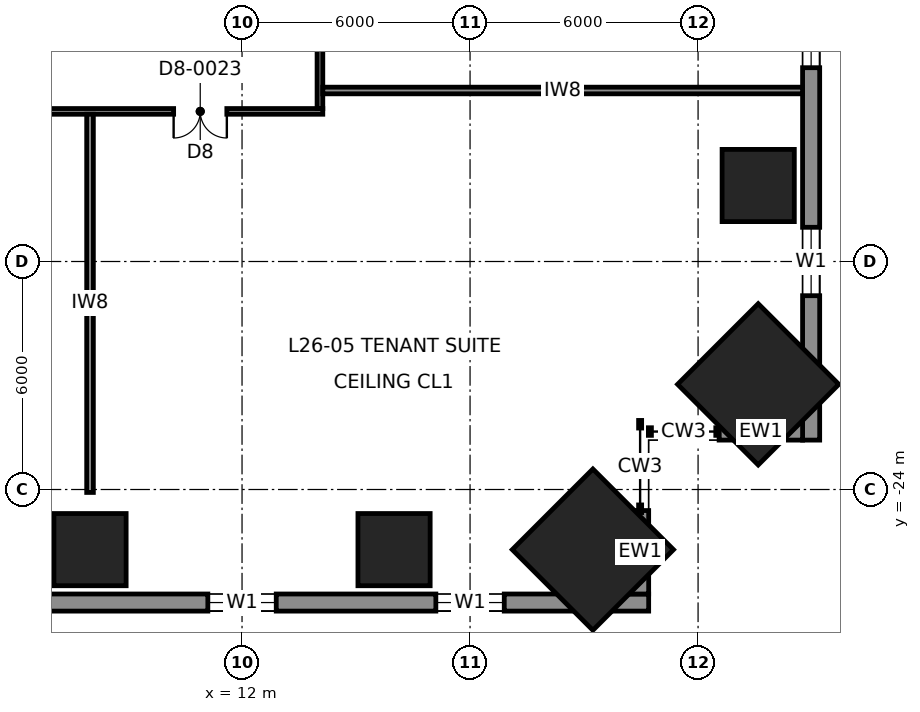
"""IFC4 building model, lengths in metres.
Left out: names, types, materials, properties, quantities, classifications, styles, units other than length and angle.
Written with IfcOpenShell. Run it as: python <this file> out.ifc"""

import sys

from ifc_helpers import new_model, si_unit, direction, frame, frame_2d, origin, origin_2d, place, context, subcontext, project, spatial, rectangle, extrude, element, fill, save


model = new_model("IFC4")
c1 = context("Model", 3, precision=1e-05, world=origin(), true_north=direction((0.0, 1.0)))
c2 = subcontext(c1, "Body", "Model", "MODEL_VIEW")
j1 = project(units=[si_unit("LENGTHUNIT", "METRE"), si_unit("PLANEANGLEUNIT", "RADIAN")], contexts=[c1])
p1 = place(None, origin())
s1 = spatial("IfcSite", under=j1, at=p1, CompositionType="ELEMENT")
p2 = place(p1, origin())
s2 = spatial("IfcBuilding", under=s1, at=p2, CompositionType="ELEMENT")
p3 = place(p2, frame((0.0, 0.0, 131.8)))
s3 = spatial("IfcBuildingStorey", under=s2, at=p3, CompositionType="ELEMENT", Elevation=131.8)
for number, where, z_axis, x_axis in (
    (1, (25.582, -21.232, 0.0), (-0.04, 0.04, 0.998), (-0.707, -0.708, 0.0)),
    (2, (21.232, -25.582, 0.0), (-0.04, 0.04, 0.998), (-0.708, -0.707, 0.0)),
):
    element("IfcColumn", number, at=place(p3, frame(where, z_axis=z_axis, x_axis=x_axis)), inside=s3, PredefinedType="COLUMN", context=c2, shape_type="SweptSolid", body=[
        extrude(rectangle(XDim=3.0, YDim=3.0, at=origin_2d()), origin(), (0.0, 0.0, 1.0), 4.007),
    ])
for number, where, z_axis, x_axis in (
    (3, (25.582, -16.0, 0.0), (-0.04, 0.0, 0.999), (0.0, -1.0, 0.0)),
    (4, (8.0, -25.582, 0.0), (0.0, 0.04, 0.999), (-1.0, 0.0, 0.0)),
    (5, (16.0, -25.582, 0.0), (0.0, 0.04, 0.999), (-1.0, 0.0, 0.0)),
):
    element("IfcColumn", number, at=place(p3, frame(where, z_axis=z_axis, x_axis=x_axis)), inside=s3, PredefinedType="COLUMN", context=c2, shape_type="SweptSolid", body=[
        extrude(rectangle(XDim=1.9, YDim=1.9, at=origin_2d()), origin(), (0.0, 0.0, 1.0), 4.003),
    ])
p4 = place(p3, frame((26.975, -22.7, 0.0), z_axis=(0.0, 0.0, 1.0), x_axis=(0.0, 1.0, 0.0)))
e6 = element("IfcWall", 6, at=p4, inside=s3, PredefinedType="SOLIDWALL", context=c2, shape_type="SweptSolid", body=[
    extrude(rectangle(XDim=45.4, YDim=0.45, at=frame_2d((22.7, 0.0))), origin(), (0.0, 0.0, 1.0), 3.83),
])
p5 = place(p4, frame((3.8, 0.0, 0.7)))
e7 = element("IfcOpeningElement", 7, at=p5, cuts=e6, PredefinedType="OPENING", context=c2, shape_type="SweptSolid", body=[
    extrude(rectangle(XDim=1.8, YDim=2.6, at=frame_2d((0.9, 1.3))), frame((0.0, 0.235, 0.0), z_axis=(0.0, -1.0, 0.0), x_axis=(1.0, 0.0, 0.0)), (0.0, 0.0, 1.0), 0.47),
])
p6 = place(p4, frame((9.8, 0.0, 0.7)))
e8 = element("IfcOpeningElement", 8, at=p6, cuts=e6, PredefinedType="OPENING", context=c2, shape_type="SweptSolid", body=[
    extrude(rectangle(XDim=1.8, YDim=2.6, at=frame_2d((0.9, 1.3))), frame((0.0, 0.235, 0.0), z_axis=(0.0, -1.0, 0.0), x_axis=(1.0, 0.0, 0.0)), (0.0, 0.0, 1.0), 0.47),
])
p7 = place(p4, frame((15.8, 0.0, 0.7)))
e9 = element("IfcOpeningElement", 9, at=p7, cuts=e6, PredefinedType="OPENING", context=c2, shape_type="SweptSolid", body=[
    extrude(rectangle(XDim=1.8, YDim=2.6, at=frame_2d((0.9, 1.3))), frame((0.0, 0.235, 0.0), z_axis=(0.0, -1.0, 0.0), x_axis=(1.0, 0.0, 0.0)), (0.0, 0.0, 1.0), 0.47),
])
p8 = place(p4, frame((18.8, 0.0, 0.7)))
e10 = element("IfcOpeningElement", 10, at=p8, cuts=e6, PredefinedType="OPENING", context=c2, shape_type="SweptSolid", body=[
    extrude(rectangle(XDim=1.8, YDim=2.6, at=frame_2d((0.9, 1.3))), frame((0.0, 0.235, 0.0), z_axis=(0.0, -1.0, 0.0), x_axis=(1.0, 0.0, 0.0)), (0.0, 0.0, 1.0), 0.47),
])
p9 = place(p4, frame((24.8, 0.0, 0.7)))
e11 = element("IfcOpeningElement", 11, at=p9, cuts=e6, PredefinedType="OPENING", context=c2, shape_type="SweptSolid", body=[
    extrude(rectangle(XDim=1.8, YDim=2.6, at=frame_2d((0.9, 1.3))), frame((0.0, 0.235, 0.0), z_axis=(0.0, -1.0, 0.0), x_axis=(1.0, 0.0, 0.0)), (0.0, 0.0, 1.0), 0.47),
])
p10 = place(p4, frame((27.8, 0.0, 0.7)))
e12 = element("IfcOpeningElement", 12, at=p10, cuts=e6, PredefinedType="OPENING", context=c2, shape_type="SweptSolid", body=[
    extrude(rectangle(XDim=1.8, YDim=2.6, at=frame_2d((0.9, 1.3))), frame((0.0, 0.235, 0.0), z_axis=(0.0, -1.0, 0.0), x_axis=(1.0, 0.0, 0.0)), (0.0, 0.0, 1.0), 0.47),
])
p11 = place(p4, frame((33.8, 0.0, 0.7)))
e13 = element("IfcOpeningElement", 13, at=p11, cuts=e6, PredefinedType="OPENING", context=c2, shape_type="SweptSolid", body=[
    extrude(rectangle(XDim=1.8, YDim=2.6, at=frame_2d((0.9, 1.3))), frame((0.0, 0.235, 0.0), z_axis=(0.0, -1.0, 0.0), x_axis=(1.0, 0.0, 0.0)), (0.0, 0.0, 1.0), 0.47),
])
p12 = place(p4, frame((39.8, 0.0, 0.7)))
e14 = element("IfcOpeningElement", 14, at=p12, cuts=e6, PredefinedType="OPENING", context=c2, shape_type="SweptSolid", body=[
    extrude(rectangle(XDim=1.8, YDim=2.6, at=frame_2d((0.9, 1.3))), frame((0.0, 0.235, 0.0), z_axis=(0.0, -1.0, 0.0), x_axis=(1.0, 0.0, 0.0)), (0.0, 0.0, 1.0), 0.47),
])
p13 = place(p3, frame((-22.7, -26.975, 0.0), z_axis=(0.0, 0.0, 1.0), x_axis=(1.0, 0.0, 0.0)))
e15 = element("IfcWall", 15, at=p13, inside=s3, PredefinedType="SOLIDWALL", context=c2, shape_type="SweptSolid", body=[
    extrude(rectangle(XDim=45.4, YDim=0.45, at=frame_2d((22.7, 0.0))), origin(), (0.0, 0.0, 1.0), 3.83),
])
p14 = place(p13, frame((3.8, 0.0, 0.7)))
e16 = element("IfcOpeningElement", 16, at=p14, cuts=e15, PredefinedType="OPENING", context=c2, shape_type="SweptSolid", body=[
    extrude(rectangle(XDim=1.8, YDim=2.6, at=frame_2d((0.9, 1.3))), frame((0.0, 0.235, 0.0), z_axis=(0.0, -1.0, 0.0), x_axis=(1.0, 0.0, 0.0)), (0.0, 0.0, 1.0), 0.47),
])
p15 = place(p13, frame((9.8, 0.0, 0.7)))
e17 = element("IfcOpeningElement", 17, at=p15, cuts=e15, PredefinedType="OPENING", context=c2, shape_type="SweptSolid", body=[
    extrude(rectangle(XDim=1.8, YDim=2.6, at=frame_2d((0.9, 1.3))), frame((0.0, 0.235, 0.0), z_axis=(0.0, -1.0, 0.0), x_axis=(1.0, 0.0, 0.0)), (0.0, 0.0, 1.0), 0.47),
])
p16 = place(p13, frame((15.8, 0.0, 0.7)))
e18 = element("IfcOpeningElement", 18, at=p16, cuts=e15, PredefinedType="OPENING", context=c2, shape_type="SweptSolid", body=[
    extrude(rectangle(XDim=1.8, YDim=2.6, at=frame_2d((0.9, 1.3))), frame((0.0, 0.235, 0.0), z_axis=(0.0, -1.0, 0.0), x_axis=(1.0, 0.0, 0.0)), (0.0, 0.0, 1.0), 0.47),
])
p17 = place(p13, frame((18.8, 0.0, 0.7)))
e19 = element("IfcOpeningElement", 19, at=p17, cuts=e15, PredefinedType="OPENING", context=c2, shape_type="SweptSolid", body=[
    extrude(rectangle(XDim=1.8, YDim=2.6, at=frame_2d((0.9, 1.3))), frame((0.0, 0.235, 0.0), z_axis=(0.0, -1.0, 0.0), x_axis=(1.0, 0.0, 0.0)), (0.0, 0.0, 1.0), 0.47),
])
p18 = place(p13, frame((24.8, 0.0, 0.7)))
e20 = element("IfcOpeningElement", 20, at=p18, cuts=e15, PredefinedType="OPENING", context=c2, shape_type="SweptSolid", body=[
    extrude(rectangle(XDim=1.8, YDim=2.6, at=frame_2d((0.9, 1.3))), frame((0.0, 0.235, 0.0), z_axis=(0.0, -1.0, 0.0), x_axis=(1.0, 0.0, 0.0)), (0.0, 0.0, 1.0), 0.47),
])
p19 = place(p13, frame((27.8, 0.0, 0.7)))
e21 = element("IfcOpeningElement", 21, at=p19, cuts=e15, PredefinedType="OPENING", context=c2, shape_type="SweptSolid", body=[
    extrude(rectangle(XDim=1.8, YDim=2.6, at=frame_2d((0.9, 1.3))), frame((0.0, 0.235, 0.0), z_axis=(0.0, -1.0, 0.0), x_axis=(1.0, 0.0, 0.0)), (0.0, 0.0, 1.0), 0.47),
])
p20 = place(p13, frame((33.8, 0.0, 0.7)))
e22 = element("IfcOpeningElement", 22, at=p20, cuts=e15, PredefinedType="OPENING", context=c2, shape_type="SweptSolid", body=[
    extrude(rectangle(XDim=1.8, YDim=2.6, at=frame_2d((0.9, 1.3))), frame((0.0, 0.235, 0.0), z_axis=(0.0, -1.0, 0.0), x_axis=(1.0, 0.0, 0.0)), (0.0, 0.0, 1.0), 0.47),
])
p21 = place(p13, frame((39.8, 0.0, 0.7)))
e23 = element("IfcOpeningElement", 23, at=p21, cuts=e15, PredefinedType="OPENING", context=c2, shape_type="SweptSolid", body=[
    extrude(rectangle(XDim=1.8, YDim=2.6, at=frame_2d((0.9, 1.3))), frame((0.0, 0.235, 0.0), z_axis=(0.0, -1.0, 0.0), x_axis=(1.0, 0.0, 0.0)), (0.0, 0.0, 1.0), 0.47),
])
for number, where, z_axis, x_axis in (
    (24, (22.475, -24.554, 0.0), (0.0, 0.0, 1.0), (0.0, -1.0, 0.0)),
    (25, (24.554, -22.475, 0.0), (0.0, 0.0, 1.0), (1.0, 0.0, 0.0)),
):
    element("IfcWall", number, at=place(p3, frame(where, z_axis=z_axis, x_axis=x_axis)), inside=s3, PredefinedType="SOLIDWALL", context=c2, shape_type="SweptSolid", body=[
        extrude(rectangle(XDim=2.196, YDim=0.45, at=frame_2d((1.098, 0.0))), origin(), (0.0, 0.0, 1.0), 3.83),
    ])
p22 = place(p3, frame((14.125, -14.05, 0.0), z_axis=(0.0, 0.0, 1.0), x_axis=(-1.0, 0.0, 0.0)))
e26 = element("IfcWall", 26, at=p22, inside=s3, PredefinedType="PARTITIONING", context=c2, shape_type="SweptSolid", body=[
    extrude(rectangle(XDim=28.25, YDim=0.15, at=frame_2d((14.125, 0.0))), origin(), (0.0, 0.0, 1.0), 3.83),
])
p23 = place(p22, frame((24.325, 0.0, 0.0)))
e27 = element("IfcOpeningElement", 27, at=p23, cuts=e26, PredefinedType="OPENING", context=c2, shape_type="SweptSolid", body=[
    extrude(rectangle(XDim=1.4, YDim=2.3, at=frame_2d((0.7, 1.15))), frame((0.0, 0.085, 0.0), z_axis=(0.0, -1.0, 0.0), x_axis=(1.0, 0.0, 0.0)), (0.0, 0.0, 1.0), 0.17),
])
p24 = place(p22, frame((13.425, 0.0, 0.0)))
e28 = element("IfcOpeningElement", 28, at=p24, cuts=e26, PredefinedType="OPENING", context=c2, shape_type="SweptSolid", body=[
    extrude(rectangle(XDim=1.4, YDim=2.3, at=frame_2d((0.7, 1.15))), frame((0.0, 0.085, 0.0), z_axis=(0.0, -1.0, 0.0), x_axis=(1.0, 0.0, 0.0)), (0.0, 0.0, 1.0), 0.17),
])
p25 = place(p22, frame((2.525, 0.0, 0.0)))
e29 = element("IfcOpeningElement", 29, at=p25, cuts=e26, PredefinedType="OPENING", context=c2, shape_type="SweptSolid", body=[
    extrude(rectangle(XDim=1.4, YDim=2.3, at=frame_2d((0.7, 1.15))), frame((0.0, 0.085, 0.0), z_axis=(0.0, -1.0, 0.0), x_axis=(1.0, 0.0, 0.0)), (0.0, 0.0, 1.0), 0.17),
])
p26 = place(p3, frame((14.05, -13.975, 0.0), z_axis=(0.0, 0.0, 1.0), x_axis=(0.0, 1.0, 0.0)))
e30 = element("IfcWall", 30, at=p26, inside=s3, PredefinedType="PARTITIONING", context=c2, shape_type="SweptSolid", body=[
    extrude(rectangle(XDim=27.55, YDim=0.15, at=frame_2d((13.775, 0.0))), origin(), (0.0, 0.0, 1.0), 3.83),
])
p27 = place(p26, frame((7.675, 0.0, 0.0)))
e31 = element("IfcOpeningElement", 31, at=p27, cuts=e30, PredefinedType="OPENING", context=c2, shape_type="SweptSolid", body=[
    extrude(rectangle(XDim=1.4, YDim=2.3, at=frame_2d((0.7, 1.15))), frame((0.0, 0.085, 0.0), z_axis=(0.0, -1.0, 0.0), x_axis=(1.0, 0.0, 0.0)), (0.0, 0.0, 1.0), 0.17),
])
p28 = place(p26, frame((21.625, 0.0, 0.0)))
e32 = element("IfcOpeningElement", 32, at=p28, cuts=e30, PredefinedType="OPENING", context=c2, shape_type="SweptSolid", body=[
    extrude(rectangle(XDim=1.4, YDim=2.3, at=frame_2d((0.7, 1.15))), frame((0.0, 0.085, 0.0), z_axis=(0.0, -1.0, 0.0), x_axis=(1.0, 0.0, 0.0)), (0.0, 0.0, 1.0), 0.17),
])
p29 = place(p26, frame((16.975, 0.0, 0.0)))
e33 = element("IfcOpeningElement", 33, at=p29, cuts=e30, PredefinedType="OPENING", context=c2, shape_type="SweptSolid", body=[
    extrude(rectangle(XDim=1.0, YDim=2.3, at=frame_2d((0.5, 1.15))), frame((0.0, 0.085, 0.0), z_axis=(0.0, -1.0, 0.0), x_axis=(1.0, 0.0, 0.0)), (0.0, 0.0, 1.0), 0.17),
])
p30 = place(p3, frame((26.75, -13.5, 0.0), z_axis=(0.0, 0.0, 1.0), x_axis=(-1.0, 0.0, 0.0)))
e34 = element("IfcWall", 34, at=p30, inside=s3, PredefinedType="PARTITIONING", context=c2, shape_type="SweptSolid", body=[
    extrude(rectangle(XDim=12.625, YDim=0.175, at=frame_2d((6.312, 0.0))), origin(), (0.0, 0.0, 1.0), 3.83),
])
p31 = place(p3, frame((8.0, -14.125, 0.0), z_axis=(0.0, 0.0, 1.0), x_axis=(0.0, -1.0, 0.0)))
e35 = element("IfcWall", 35, at=p31, inside=s3, PredefinedType="PARTITIONING", context=c2, shape_type="SweptSolid", body=[
    extrude(rectangle(XDim=9.952, YDim=0.175, at=frame_2d((4.976, 0.0))), origin(), (0.0, 0.0, 1.0), 2.83),
])
p32 = place(p5, origin())
e36 = element("IfcWindow", 36, at=p32, inside=s3, PartitioningType="SINGLE_PANEL", PredefinedType="WINDOW", context=c2, shape_type="SweptSolid", body=[
    extrude(rectangle(XDim=1.8, YDim=2.6, at=frame_2d((0.9, 1.3))), frame((0.0, 0.03, 0.0), z_axis=(0.0, -1.0, 0.0), x_axis=(1.0, 0.0, 0.0)), (0.0, 0.0, 1.0), 0.06),
])
fill(e7, e36)
p33 = place(p6, origin())
e37 = element("IfcWindow", 37, at=p33, inside=s3, PartitioningType="SINGLE_PANEL", PredefinedType="WINDOW", context=c2, shape_type="SweptSolid", body=[
    extrude(rectangle(XDim=1.8, YDim=2.6, at=frame_2d((0.9, 1.3))), frame((0.0, 0.03, 0.0), z_axis=(0.0, -1.0, 0.0), x_axis=(1.0, 0.0, 0.0)), (0.0, 0.0, 1.0), 0.06),
])
fill(e8, e37)
p34 = place(p20, origin())
e38 = element("IfcWindow", 38, at=p34, inside=s3, PartitioningType="SINGLE_PANEL", PredefinedType="WINDOW", context=c2, shape_type="SweptSolid", body=[
    extrude(rectangle(XDim=1.8, YDim=2.6, at=frame_2d((0.9, 1.3))), frame((0.0, 0.03, 0.0), z_axis=(0.0, -1.0, 0.0), x_axis=(1.0, 0.0, 0.0)), (0.0, 0.0, 1.0), 0.06),
])
fill(e22, e38)
p35 = place(p21, origin())
e39 = element("IfcWindow", 39, at=p35, inside=s3, PartitioningType="SINGLE_PANEL", PredefinedType="WINDOW", context=c2, shape_type="SweptSolid", body=[
    extrude(rectangle(XDim=1.8, YDim=2.6, at=frame_2d((0.9, 1.3))), frame((0.0, 0.03, 0.0), z_axis=(0.0, -1.0, 0.0), x_axis=(1.0, 0.0, 0.0)), (0.0, 0.0, 1.0), 0.06),
])
fill(e23, e39)
p36 = place(p25, origin())
e40 = element("IfcDoor", 40, at=p36, inside=s3, OperationType="DOUBLE_DOOR_SINGLE_SWING", PredefinedType="DOOR", context=c2, shape_type="SweptSolid", body=[
    extrude(rectangle(XDim=1.4, YDim=2.3, at=frame_2d((0.7, 1.15))), frame((0.0, 0.025, 0.0), z_axis=(0.0, -1.0, 0.0), x_axis=(1.0, 0.0, 0.0)), (0.0, 0.0, 1.0), 0.05),
])
fill(e29, e40)
save(model, sys.argv[1])
